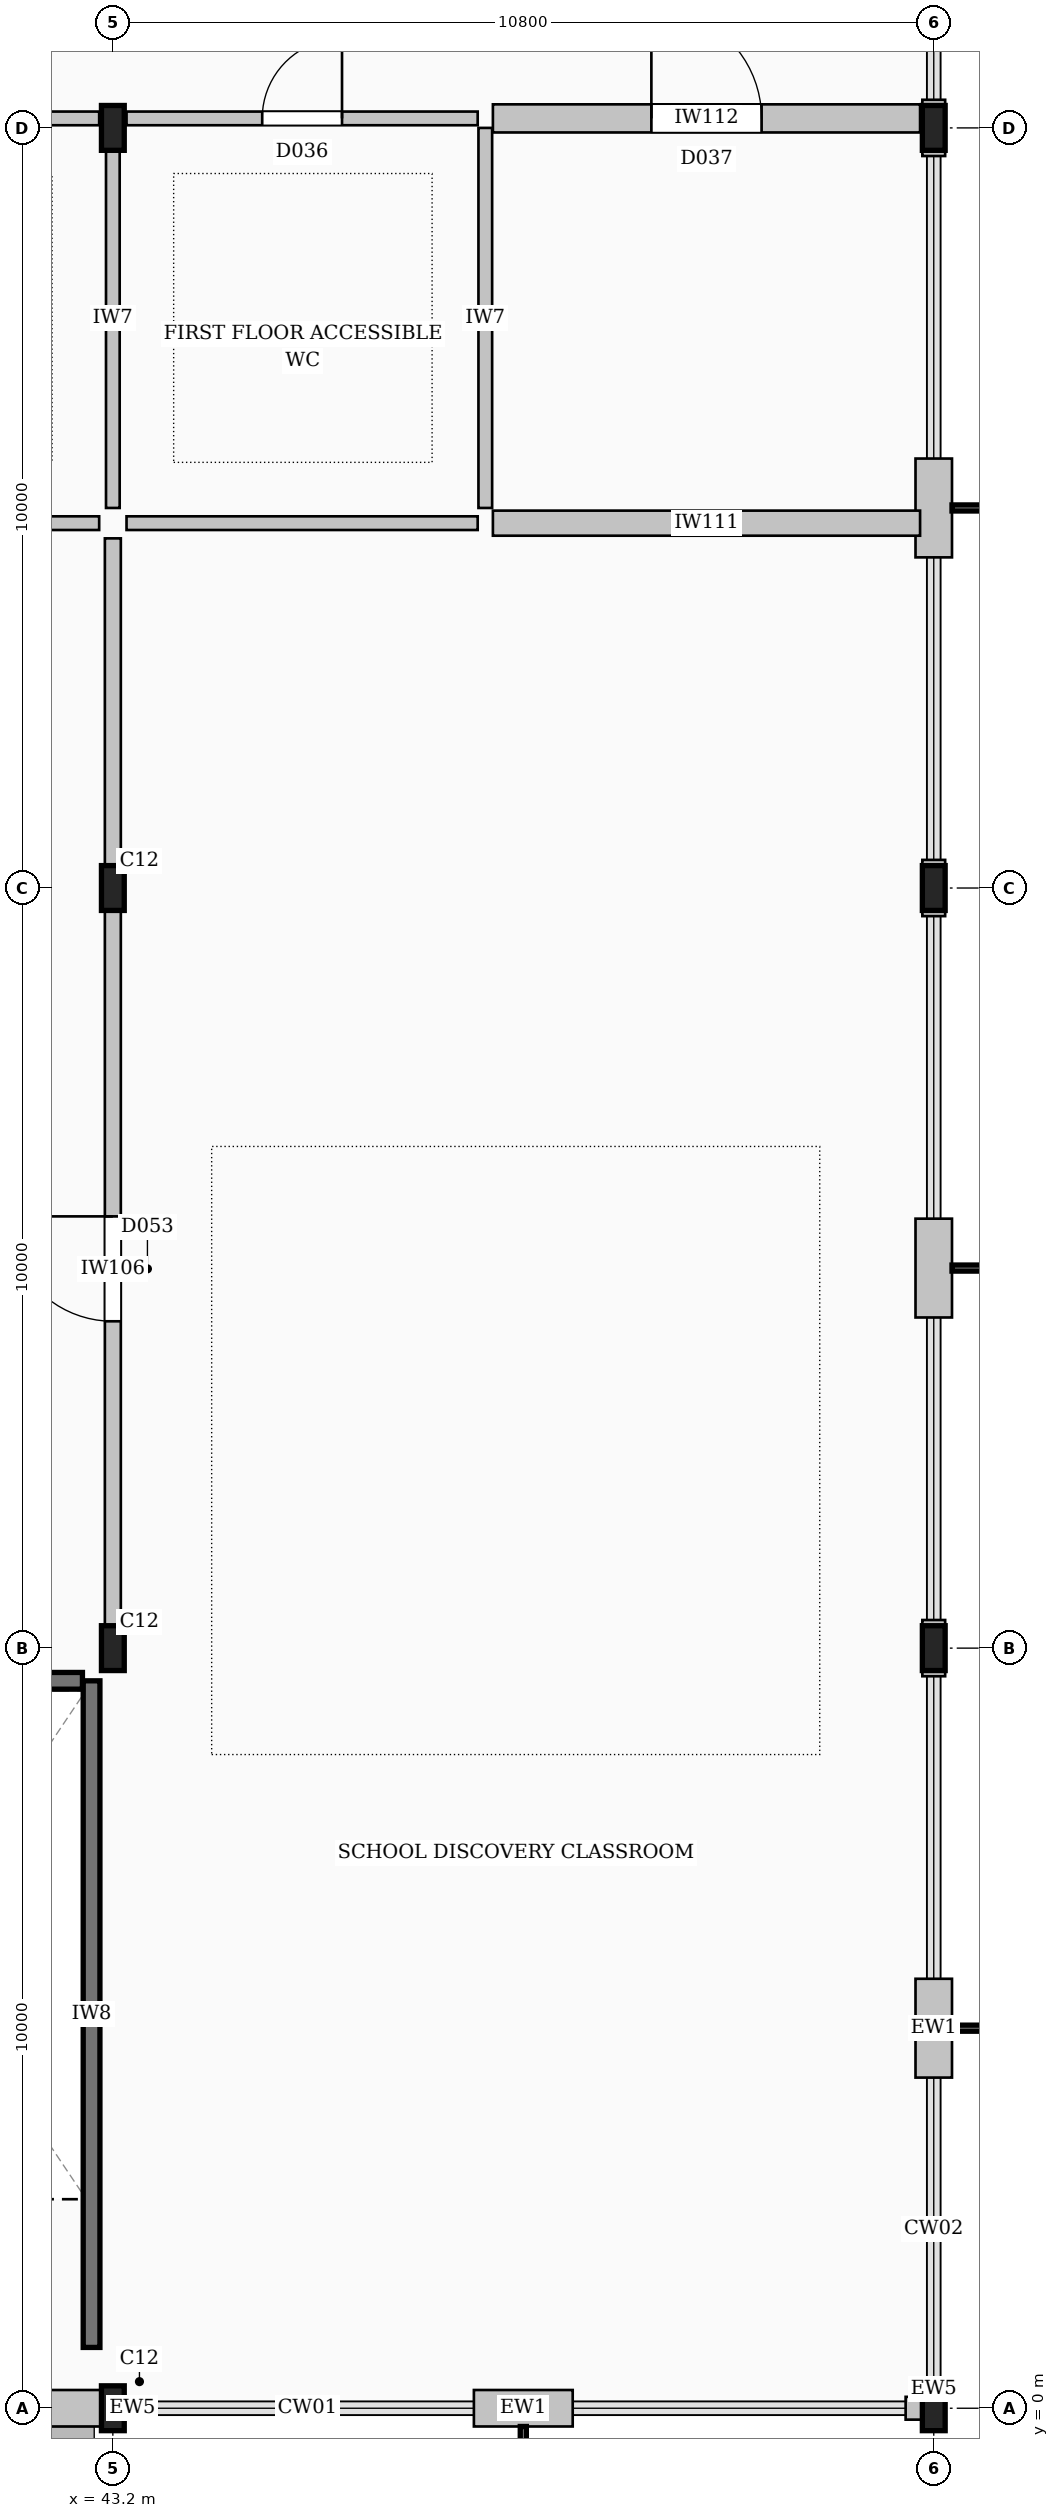
"""IFC4 building model, lengths in metres.
Left out: names, types, materials, properties, quantities, classifications, styles, units other than length and angle.
Written with IfcOpenShell. Run it as: python <this file> out.ifc"""

import sys

from ifc_helpers import new_model, si_unit, direction, frame, frame_2d, origin, origin_2d, place, context, subcontext, project, spatial, rectangle, i_section, extrude, element, fill, save


model = new_model("IFC4")
c1 = context("Model", 3, precision=1e-05, world=origin(), true_north=direction((0.0, 1.0)))
c2 = subcontext(c1, "Body", "Model", "MODEL_VIEW")
j1 = project(units=[si_unit("LENGTHUNIT", "METRE"), si_unit("PLANEANGLEUNIT", "RADIAN")], contexts=[c1])
p1 = place(None, origin())
s1 = spatial("IfcSite", under=j1, at=p1, CompositionType="ELEMENT")
p2 = place(p1, origin())
s2 = spatial("IfcBuilding", under=s1, at=p2, CompositionType="ELEMENT")
p3 = place(p2, frame((0.0, 0.0, 4.8)))
s3 = spatial("IfcBuildingStorey", under=s2, at=p3, CompositionType="ELEMENT", Elevation=4.8)
for number, where, z_axis, x_axis in (
    (1, (43.2, 0.0, 0.0), (0.0, 0.0, 1.0), (1.0, 0.0, 0.0)),
    (2, (43.2, 10.0, 0.0), (0.0, 0.0, 1.0), (1.0, 0.0, 0.0)),
    (3, (43.2, 20.0, 0.0), (0.0, 0.0, 1.0), (1.0, 0.0, 0.0)),
    (4, (43.2, 30.0, 0.0), (0.0, 0.0, 1.0), (1.0, 0.0, 0.0)),
    (5, (54.0, 0.0, 0.0), (0.0, 0.0, 1.0), (1.0, 0.0, 0.0)),
    (6, (54.0, 10.0, 0.0), (0.0, 0.0, 1.0), (1.0, 0.0, 0.0)),
    (7, (54.0, 20.0, 0.0), (0.0, 0.0, 1.0), (1.0, 0.0, 0.0)),
    (8, (54.0, 30.0, 0.0), (0.0, 0.0, 1.0), (1.0, 0.0, 0.0)),
):
    element("IfcColumn", number, at=place(p3, frame(where, z_axis=z_axis, x_axis=x_axis)), inside=s3, PredefinedType="COLUMN", context=c2, shape_type="SweptSolid", body=[
        extrude(i_section(OverallWidth=0.3, OverallDepth=0.59, WebThickness=0.013, FlangeThickness=0.025, FilletRadius=0.027, at=origin_2d()), origin(), (0.0, 0.0, 1.0), 4.8),
    ])
p4 = place(p3, frame((32.545, 0.0, 0.0), z_axis=(0.0, 0.0, 1.0), x_axis=(1.0, 0.0, 0.0)))
e9 = element("IfcWall", 9, at=p4, inside=s3, PredefinedType="STANDARD", context=c2, shape_type="SweptSolid", body=[
    extrude(rectangle(XDim=10.51, YDim=0.48, at=frame_2d((5.255, 0.0))), origin(), (0.0, 0.0, 1.0), 4.059),
])
p5 = place(p4, frame((3.055, 0.0, 1.0)))
e10 = element("IfcOpeningElement", 10, at=p5, cuts=e9, PredefinedType="OPENING", context=c2, shape_type="SweptSolid", body=[
    extrude(rectangle(XDim=4.4, YDim=1.8, at=frame_2d((2.2, 0.9))), frame((0.0, 0.25, 0.0), z_axis=(0.0, -1.0, 0.0), x_axis=(1.0, 0.0, 0.0)), (0.0, 0.0, 1.0), 0.5),
])
p6 = place(p3, frame((47.95, 0.0, 0.0), z_axis=(0.0, 0.0, 1.0), x_axis=(1.0, 0.0, 0.0)))
e11 = element("IfcWall", 11, at=p6, inside=s3, PredefinedType="STANDARD", context=c2, shape_type="SweptSolid", body=[
    extrude(rectangle(XDim=1.3, YDim=0.48, at=frame_2d((0.65, 0.0))), origin(), (0.0, 0.0, 1.0), 4.059),
])
for number, where, z_axis, x_axis in (
    (12, (43.345, 0.0, 0.0), (0.0, 0.0, 1.0), (1.0, 0.0, 0.0)),
    (13, (53.63, 0.0, 0.0), (0.0, 0.0, 1.0), (1.0, 0.0, 0.0)),
):
    element("IfcWall", number, at=place(p3, frame(where, z_axis=z_axis, x_axis=x_axis)), inside=s3, PredefinedType="STANDARD", context=c2, shape_type="SweptSolid", body=[
        extrude(rectangle(XDim=0.225, YDim=0.3, at=frame_2d((0.113, 0.0))), origin(), (0.0, 0.0, 1.0), 4.56),
    ])
p7 = place(p3, frame((54.0, 4.35, 0.0), z_axis=(0.0, 0.0, 1.0), x_axis=(0.0, 1.0, 0.0)))
e14 = element("IfcWall", 14, at=p7, inside=s3, PredefinedType="STANDARD", context=c2, shape_type="SweptSolid", body=[
    extrude(rectangle(XDim=1.3, YDim=0.48, at=frame_2d((0.65, 0.0))), origin(), (0.0, 0.0, 1.0), 4.56),
])
for number, where, z_axis, x_axis in (
    (15, (54.0, 0.145, 0.0), (0.0, 0.0, 1.0), (0.0, 1.0, 0.0)),
    (16, (54.0, 9.63, 0.0), (0.0, 0.0, 1.0), (0.0, 1.0, 0.0)),
):
    element("IfcWall", number, at=place(p3, frame(where, z_axis=z_axis, x_axis=x_axis)), inside=s3, PredefinedType="STANDARD", context=c2, shape_type="SweptSolid", body=[
        extrude(rectangle(XDim=0.225, YDim=0.3, at=frame_2d((0.113, 0.0))), origin(), (0.0, 0.0, 1.0), 4.56),
    ])
p8 = place(p3, frame((54.0, 14.35, 0.0), z_axis=(0.0, 0.0, 1.0), x_axis=(0.0, 1.0, 0.0)))
e17 = element("IfcWall", 17, at=p8, inside=s3, PredefinedType="STANDARD", context=c2, shape_type="SweptSolid", body=[
    extrude(rectangle(XDim=1.3, YDim=0.48, at=frame_2d((0.65, 0.0))), origin(), (0.0, 0.0, 1.0), 4.56),
])
for number, where, z_axis, x_axis in (
    (18, (54.0, 10.145, 0.0), (0.0, 0.0, 1.0), (0.0, 1.0, 0.0)),
    (19, (54.0, 19.63, 0.0), (0.0, 0.0, 1.0), (0.0, 1.0, 0.0)),
):
    element("IfcWall", number, at=place(p3, frame(where, z_axis=z_axis, x_axis=x_axis)), inside=s3, PredefinedType="STANDARD", context=c2, shape_type="SweptSolid", body=[
        extrude(rectangle(XDim=0.225, YDim=0.3, at=frame_2d((0.113, 0.0))), origin(), (0.0, 0.0, 1.0), 4.56),
    ])
p9 = place(p3, frame((54.0, 24.35, 0.0), z_axis=(0.0, 0.0, 1.0), x_axis=(0.0, 1.0, 0.0)))
e20 = element("IfcWall", 20, at=p9, inside=s3, PredefinedType="STANDARD", context=c2, shape_type="SweptSolid", body=[
    extrude(rectangle(XDim=1.3, YDim=0.48, at=frame_2d((0.65, 0.0))), origin(), (0.0, 0.0, 1.0), 4.56),
])
for number, where, z_axis, x_axis in (
    (21, (54.0, 20.145, 0.0), (0.0, 0.0, 1.0), (0.0, 1.0, 0.0)),
    (22, (54.0, 29.63, 0.0), (0.0, 0.0, 1.0), (0.0, 1.0, 0.0)),
    (23, (54.0, 30.145, 0.0), (0.0, 0.0, 1.0), (0.0, 1.0, 0.0)),
):
    element("IfcWall", number, at=place(p3, frame(where, z_axis=z_axis, x_axis=x_axis)), inside=s3, PredefinedType="STANDARD", context=c2, shape_type="SweptSolid", body=[
        extrude(rectangle(XDim=0.225, YDim=0.3, at=frame_2d((0.113, 0.0))), origin(), (0.0, 0.0, 1.0), 4.56),
    ])
p10 = place(p3, frame((42.92, 0.8, 0.0), z_axis=(0.0, 0.0, 1.0), x_axis=(0.0, 1.0, 0.0)))
e24 = element("IfcWall", 24, at=p10, inside=s3, PredefinedType="SHEAR", context=c2, shape_type="SweptSolid", body=[
    extrude(rectangle(XDim=8.77, YDim=0.22, at=frame_2d((4.385, 0.0))), origin(), (0.0, 0.0, 1.0), 4.56),
])
p11 = place(p3, frame((38.4, 9.57, 0.0), z_axis=(0.0, 0.0, 1.0), x_axis=(1.0, 0.0, 0.0)))
e25 = element("IfcWall", 25, at=p11, inside=s3, PredefinedType="SHEAR", context=c2, shape_type="SweptSolid", body=[
    extrude(rectangle(XDim=4.4, YDim=0.22, at=frame_2d((2.2, 0.0))), origin(), (0.0, 0.0, 1.0), 4.56),
])
p12 = place(p3, frame((38.0, 30.125, 0.0), z_axis=(0.0, 0.0, 1.0), x_axis=(1.0, 0.0, 0.0)))
e26 = element("IfcWall", 26, at=p12, inside=s3, PredefinedType="PLUMBINGWALL", context=c2, shape_type="SweptSolid", body=[
    extrude(rectangle(XDim=5.02, YDim=0.18, at=frame_2d((2.51, 0.0))), origin(), (0.0, 0.0, 1.0), 4.059),
])
p13 = place(p12, frame((1.885, 0.0, 0.0)))
e27 = element("IfcOpeningElement", 27, at=p13, cuts=e26, PredefinedType="OPENING", context=c2, shape_type="SweptSolid", body=[
    extrude(rectangle(XDim=1.25, YDim=2.3, at=frame_2d((0.625, 1.15))), frame((0.0, 0.1, 0.0), z_axis=(0.0, -1.0, 0.0), x_axis=(1.0, 0.0, 0.0)), (0.0, 0.0, 1.0), 0.2),
])
p14 = place(p3, frame((43.38, 30.125, 0.0), z_axis=(0.0, 0.0, 1.0), x_axis=(1.0, 0.0, 0.0)))
e28 = element("IfcWall", 28, at=p14, inside=s3, PredefinedType="PLUMBINGWALL", context=c2, shape_type="SweptSolid", body=[
    extrude(rectangle(XDim=4.62, YDim=0.18, at=frame_2d((2.31, 0.0))), origin(), (0.0, 0.0, 1.0), 4.059),
])
p15 = place(p14, frame((1.785, 0.0, 0.0)))
e29 = element("IfcOpeningElement", 29, at=p15, cuts=e28, PredefinedType="OPENING", context=c2, shape_type="SweptSolid", body=[
    extrude(rectangle(XDim=1.05, YDim=2.15, at=frame_2d((0.525, 1.075))), frame((0.0, 0.1, 0.0), z_axis=(0.0, -1.0, 0.0), x_axis=(1.0, 0.0, 0.0)), (0.0, 0.0, 1.0), 0.2),
])
p16 = place(p3, frame((48.2, 30.125, 0.0), z_axis=(0.0, 0.0, 1.0), x_axis=(1.0, 0.0, 0.0)))
e30 = element("IfcWall", 30, at=p16, inside=s3, PredefinedType="PARTITIONING", context=c2, shape_type="SweptSolid", body=[
    extrude(rectangle(XDim=5.62, YDim=0.37, at=frame_2d((2.81, 0.0))), origin(), (0.0, 0.0, 1.0), 4.059),
])
p17 = place(p16, frame((2.085, 0.0, 0.0)))
e31 = element("IfcOpeningElement", 31, at=p17, cuts=e30, PredefinedType="OPENING", context=c2, shape_type="SweptSolid", body=[
    extrude(rectangle(XDim=1.45, YDim=2.35, at=frame_2d((0.725, 1.175))), frame((0.0, 0.195, 0.0), z_axis=(0.0, -1.0, 0.0), x_axis=(1.0, 0.0, 0.0)), (0.0, 0.0, 1.0), 0.39),
])
p18 = place(p3, frame((43.2, 10.18, 0.0), z_axis=(0.0, 0.0, 1.0), x_axis=(0.0, 1.0, 0.0)))
e32 = element("IfcWall", 32, at=p18, inside=s3, PredefinedType="PARTITIONING", context=c2, shape_type="SweptSolid", body=[
    extrude(rectangle(XDim=9.62, YDim=0.21, at=frame_2d((4.81, 0.0))), origin(), (0.0, 0.0, 1.0), 4.05),
])
p19 = place(p18, frame((4.12, 0.0, 0.0)))
e33 = element("IfcOpeningElement", 33, at=p19, cuts=e32, PredefinedType="OPENING", context=c2, shape_type="SweptSolid", body=[
    extrude(rectangle(XDim=1.38, YDim=2.38, at=frame_2d((0.69, 1.19))), frame((0.0, 0.115, 0.0), z_axis=(0.0, -1.0, 0.0), x_axis=(1.0, 0.0, 0.0)), (0.0, 0.0, 1.0), 0.23),
])
p20 = place(p3, frame((43.2, 20.2, 0.0), z_axis=(0.0, 0.0, 1.0), x_axis=(0.0, 1.0, 0.0)))
e34 = element("IfcWall", 34, at=p20, inside=s3, PredefinedType="PARTITIONING", context=c2, shape_type="SweptSolid", body=[
    extrude(rectangle(XDim=4.4, YDim=0.21, at=frame_2d((2.2, 0.0))), origin(), (0.0, 0.0, 1.0), 4.05),
])
p21 = place(p3, frame((38.0, 24.8, 0.0), z_axis=(0.0, 0.0, 1.0), x_axis=(1.0, 0.0, 0.0)))
e35 = element("IfcWall", 35, at=p21, inside=s3, PredefinedType="PLUMBINGWALL", context=c2, shape_type="SweptSolid", body=[
    extrude(rectangle(XDim=5.02, YDim=0.18, at=frame_2d((2.51, 0.0))), origin(), (0.0, 0.0, 1.0), 4.52),
])
p22 = place(p3, frame((43.38, 24.8, 0.0), z_axis=(0.0, 0.0, 1.0), x_axis=(1.0, 0.0, 0.0)))
e36 = element("IfcWall", 36, at=p22, inside=s3, PredefinedType="PLUMBINGWALL", context=c2, shape_type="SweptSolid", body=[
    extrude(rectangle(XDim=4.62, YDim=0.18, at=frame_2d((2.31, 0.0))), origin(), (0.0, 0.0, 1.0), 4.52),
])
p23 = place(p3, frame((48.2, 24.8, 0.0), z_axis=(0.0, 0.0, 1.0), x_axis=(1.0, 0.0, 0.0)))
e37 = element("IfcWall", 37, at=p23, inside=s3, PredefinedType="PARTITIONING", context=c2, shape_type="SweptSolid", body=[
    extrude(rectangle(XDim=5.62, YDim=0.33, at=frame_2d((2.81, 0.0))), origin(), (0.0, 0.0, 1.0), 4.52),
])
p24 = place(p3, frame((43.2, 25.0, 0.0), z_axis=(0.0, 0.0, 1.0), x_axis=(0.0, 1.0, 0.0)))
e38 = element("IfcWall", 38, at=p24, inside=s3, PredefinedType="PLUMBINGWALL", context=c2, shape_type="SweptSolid", body=[
    extrude(rectangle(XDim=5.0, YDim=0.18, at=frame_2d((2.5, 0.0))), origin(), (0.0, 0.0, 1.0), 4.05),
])
p25 = place(p3, frame((48.1, 25.0, 0.0), z_axis=(0.0, 0.0, 1.0), x_axis=(0.0, 1.0, 0.0)))
e39 = element("IfcWall", 39, at=p25, inside=s3, PredefinedType="PLUMBINGWALL", context=c2, shape_type="SweptSolid", body=[
    extrude(rectangle(XDim=5.0, YDim=0.18, at=frame_2d((2.5, 0.0))), origin(), (0.0, 0.0, 1.0), 4.52),
])
p26 = place(p15, origin())
e40 = element("IfcDoor", 40, at=p26, inside=s3, OperationType="SINGLE_SWING_RIGHT", PredefinedType="DOOR", context=c2, shape_type="SweptSolid", body=[
    extrude(rectangle(XDim=1.05, YDim=2.15, at=frame_2d((0.525, 1.075))), frame((0.0, 0.025, 0.0), z_axis=(0.0, -1.0, 0.0), x_axis=(1.0, 0.0, 0.0)), (0.0, 0.0, 1.0), 0.05),
])
fill(e29, e40)
p27 = place(p17, origin())
e41 = element("IfcDoor", 41, at=p27, inside=s3, OperationType="SINGLE_SWING_LEFT", PredefinedType="DOOR", context=c2, shape_type="SweptSolid", body=[
    extrude(rectangle(XDim=1.45, YDim=2.35, at=frame_2d((0.725, 1.175))), frame((0.0, 0.025, 0.0), z_axis=(0.0, -1.0, 0.0), x_axis=(1.0, 0.0, 0.0)), (0.0, 0.0, 1.0), 0.05),
])
fill(e31, e41)
p28 = place(p19, origin())
e42 = element("IfcDoor", 42, at=p28, inside=s3, OperationType="SINGLE_SWING_RIGHT", PredefinedType="DOOR", context=c2, shape_type="SweptSolid", body=[
    extrude(rectangle(XDim=1.38, YDim=2.38, at=frame_2d((0.69, 1.19))), frame((0.0, 0.025, 0.0), z_axis=(0.0, -1.0, 0.0), x_axis=(1.0, 0.0, 0.0)), (0.0, 0.0, 1.0), 0.05),
])
fill(e33, e42)
save(model, sys.argv[1])
